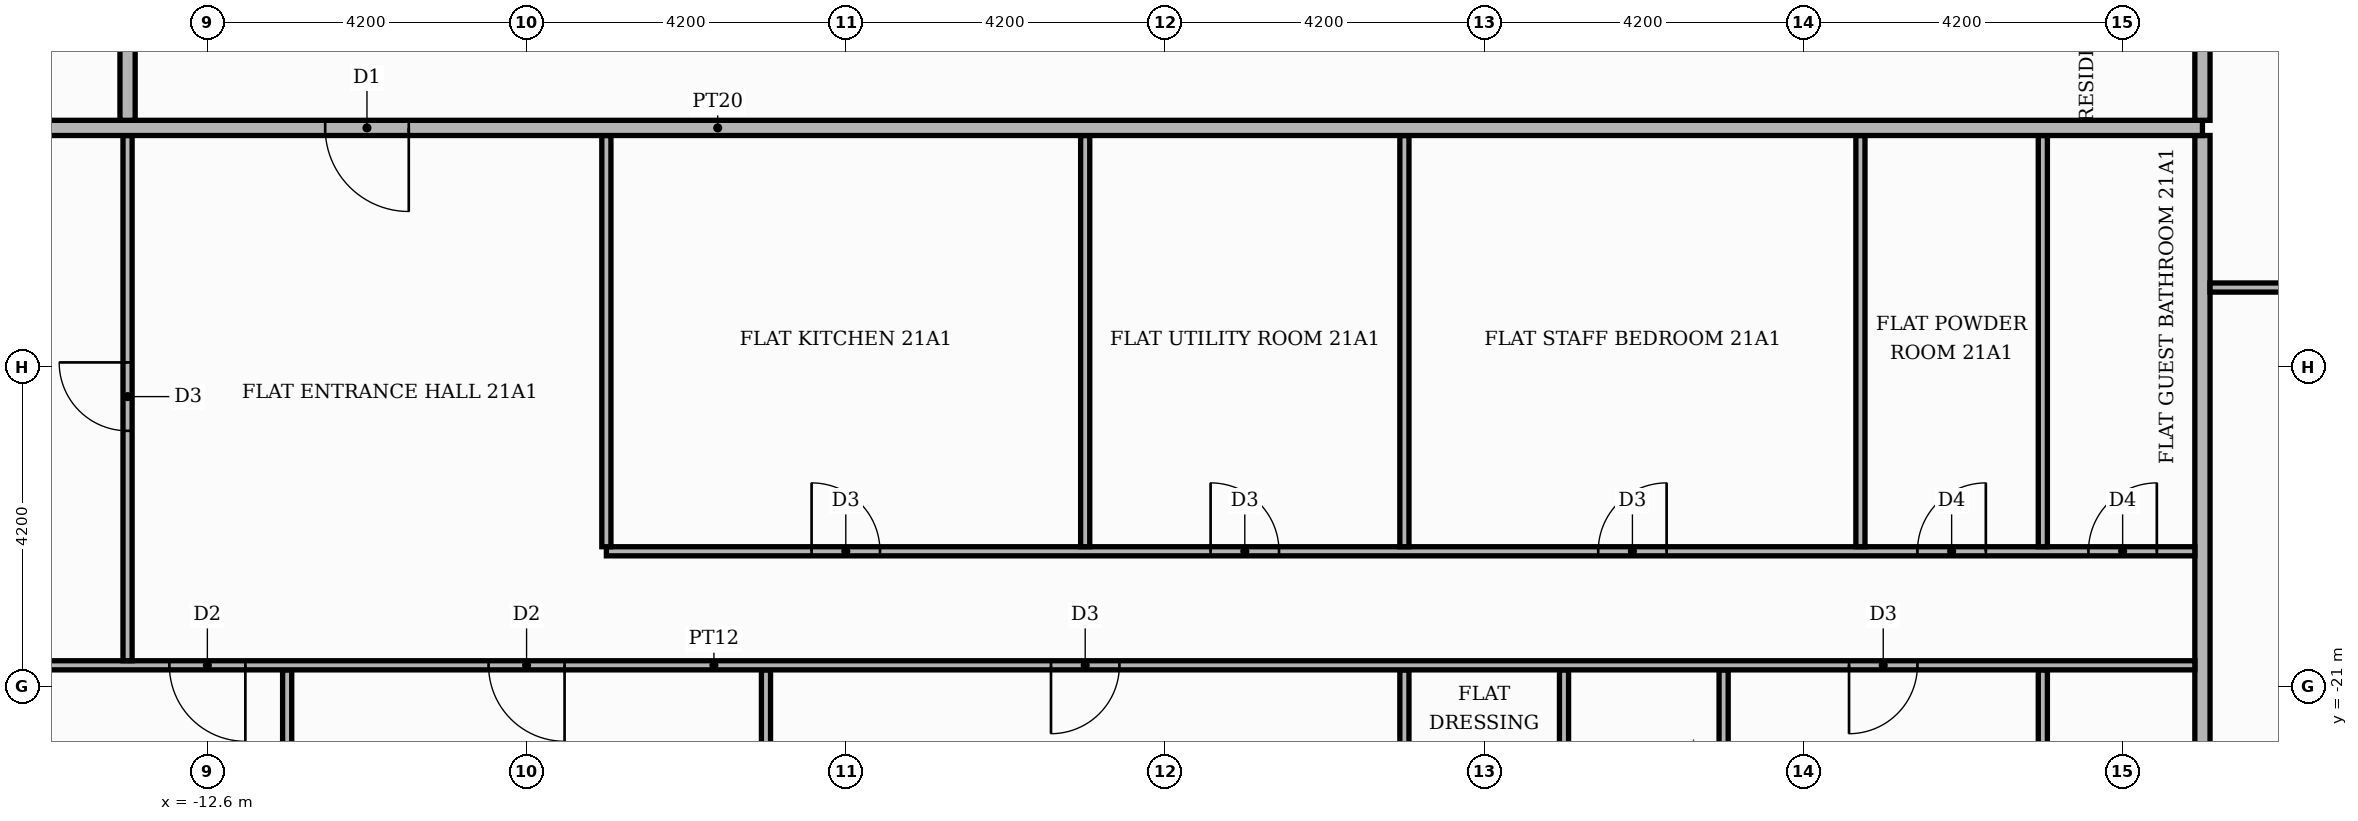
"""IFC4 building model, lengths in metres.
Left out: names, types, materials, properties, quantities, classifications, styles, units other than length and angle.
Written with IfcOpenShell. Run it as: python <this file> out.ifc"""

import sys

from ifc_helpers import new_model, si_unit, direction, frame, frame_2d, origin, place, context, subcontext, project, spatial, rectangle, extrude, element, fill, save


model = new_model("IFC4")
c1 = context("Model", 3, precision=1e-05, world=origin(), true_north=direction((0.0, 1.0)))
c2 = subcontext(c1, "Body", "Model", "MODEL_VIEW")
j1 = project(units=[si_unit("LENGTHUNIT", "METRE"), si_unit("PLANEANGLEUNIT", "RADIAN")], contexts=[c1])
p1 = place(None, origin())
s1 = spatial("IfcSite", under=j1, at=p1, CompositionType="ELEMENT")
p2 = place(p1, origin())
s2 = spatial("IfcBuilding", under=s1, at=p2, CompositionType="ELEMENT")
p3 = place(p2, frame((0.0, 0.0, 90.9)))
s3 = spatial("IfcBuildingStorey", under=s2, at=p3, CompositionType="ELEMENT", Elevation=90.9)
for number, where, z_axis, x_axis in (
    (1, (-11.55, -25.42, 0.0), (0.0, 0.0, 1.0), (0.0, 1.0, 0.0)),
    (2, (-5.25, -25.42, 0.0), (0.0, 0.0, 1.0), (0.0, 1.0, 0.0)),
):
    element("IfcWall", number, at=place(p3, frame(where, z_axis=z_axis, x_axis=x_axis)), inside=s3, PredefinedType="PARTITIONING", context=c2, shape_type="SweptSolid", body=[
        extrude(rectangle(XDim=4.64, YDim=0.12, at=frame_2d((2.32, 0.0))), origin(), (0.0, 0.0, 1.0), 3.48),
    ])
p4 = place(p3, frame((3.15, -25.42, 0.0), z_axis=(0.0, 0.0, 1.0), x_axis=(0.0, 1.0, 0.0)))
e3 = element("IfcWall", 3, at=p4, inside=s3, PredefinedType="PARTITIONING", context=c2, shape_type="SweptSolid", body=[
    extrude(rectangle(XDim=4.64, YDim=0.12, at=frame_2d((2.32, 0.0))), origin(), (0.0, 0.0, 1.0), 3.48),
])
p5 = place(p4, frame((1.75, 0.0, 0.0)))
e4 = element("IfcOpeningElement", 4, at=p5, cuts=e3, PredefinedType="OPENING", context=c2, shape_type="SweptSolid", body=[
    extrude(rectangle(XDim=0.9, YDim=2.1, at=frame_2d((0.45, 1.05))), frame((0.0, 0.07, 0.0), z_axis=(0.0, -1.0, 0.0), x_axis=(1.0, 0.0, 0.0)), (0.0, 0.0, 1.0), 0.14),
])
p6 = place(p3, frame((5.25, -25.42, 0.0), z_axis=(0.0, 0.0, 1.0), x_axis=(0.0, 1.0, 0.0)))
e5 = element("IfcWall", 5, at=p6, inside=s3, PredefinedType="PARTITIONING", context=c2, shape_type="SweptSolid", body=[
    extrude(rectangle(XDim=4.64, YDim=0.12, at=frame_2d((2.32, 0.0))), origin(), (0.0, 0.0, 1.0), 3.48),
])
p7 = place(p6, frame((1.75, 0.0, 0.0)))
e6 = element("IfcOpeningElement", 6, at=p7, cuts=e5, PredefinedType="OPENING", context=c2, shape_type="SweptSolid", body=[
    extrude(rectangle(XDim=0.9, YDim=2.1, at=frame_2d((0.45, 1.05))), frame((0.0, 0.07, 0.0), z_axis=(0.0, -1.0, 0.0), x_axis=(1.0, 0.0, 0.0)), (0.0, 0.0, 1.0), 0.14),
])
p8 = place(p3, frame((7.35, -25.42, 0.0), z_axis=(0.0, 0.0, 1.0), x_axis=(0.0, 1.0, 0.0)))
e7 = element("IfcWall", 7, at=p8, inside=s3, PredefinedType="PARTITIONING", context=c2, shape_type="SweptSolid", body=[
    extrude(rectangle(XDim=4.64, YDim=0.12, at=frame_2d((2.32, 0.0))), origin(), (0.0, 0.0, 1.0), 3.48),
])
p9 = place(p3, frame((11.55, -25.42, 0.0), z_axis=(0.0, 0.0, 1.0), x_axis=(0.0, 1.0, 0.0)))
e8 = element("IfcWall", 8, at=p9, inside=s3, PredefinedType="PARTITIONING", context=c2, shape_type="SweptSolid", body=[
    extrude(rectangle(XDim=4.64, YDim=0.12, at=frame_2d((2.32, 0.0))), origin(), (0.0, 0.0, 1.0), 3.48),
])
p10 = place(p9, frame((1.75, 0.0, 0.0)))
e9 = element("IfcOpeningElement", 9, at=p10, cuts=e8, PredefinedType="OPENING", context=c2, shape_type="SweptSolid", body=[
    extrude(rectangle(XDim=0.9, YDim=2.1, at=frame_2d((0.45, 1.05))), frame((0.0, 0.07, 0.0), z_axis=(0.0, -1.0, 0.0), x_axis=(1.0, 0.0, 0.0)), (0.0, 0.0, 1.0), 0.14),
])
p11 = place(p3, frame((13.65, -25.42, 0.0), z_axis=(0.0, 0.0, 1.0), x_axis=(0.0, 1.0, 0.0)))
e10 = element("IfcWall", 10, at=p11, inside=s3, PredefinedType="PARTITIONING", context=c2, shape_type="SweptSolid", body=[
    extrude(rectangle(XDim=11.67, YDim=0.2, at=frame_2d((5.835, 0.0))), origin(), (0.0, 0.0, 1.0), 3.48),
])
p12 = place(p3, frame((-25.42, -20.72, 0.0), z_axis=(0.0, 0.0, 1.0), x_axis=(1.0, 0.0, 0.0)))
e11 = element("IfcWall", 11, at=p12, inside=s3, PredefinedType="PARTITIONING", context=c2, shape_type="SweptSolid", body=[
    extrude(rectangle(XDim=38.97, YDim=0.12, at=frame_2d((19.485, 0.0))), origin(), (0.0, 0.0, 1.0), 3.48),
])
p13 = place(p12, frame((12.32, 0.0, 0.0)))
e12 = element("IfcOpeningElement", 12, at=p13, cuts=e11, PredefinedType="OPENING", context=c2, shape_type="SweptSolid", body=[
    extrude(rectangle(XDim=1.0, YDim=2.1, at=frame_2d((0.5, 1.05))), frame((0.0, 0.07, 0.0), z_axis=(0.0, -1.0, 0.0), x_axis=(1.0, 0.0, 0.0)), (0.0, 0.0, 1.0), 0.14),
])
p14 = place(p12, frame((16.52, 0.0, 0.0)))
e13 = element("IfcOpeningElement", 13, at=p14, cuts=e11, PredefinedType="OPENING", context=c2, shape_type="SweptSolid", body=[
    extrude(rectangle(XDim=1.0, YDim=2.1, at=frame_2d((0.5, 1.05))), frame((0.0, 0.07, 0.0), z_axis=(0.0, -1.0, 0.0), x_axis=(1.0, 0.0, 0.0)), (0.0, 0.0, 1.0), 0.14),
])
p15 = place(p12, frame((23.92, 0.0, 0.0)))
e14 = element("IfcOpeningElement", 14, at=p15, cuts=e11, PredefinedType="OPENING", context=c2, shape_type="SweptSolid", body=[
    extrude(rectangle(XDim=0.9, YDim=2.1, at=frame_2d((0.45, 1.05))), frame((0.0, 0.07, 0.0), z_axis=(0.0, -1.0, 0.0), x_axis=(1.0, 0.0, 0.0)), (0.0, 0.0, 1.0), 0.14),
])
p16 = place(p12, frame((34.42, 0.0, 0.0)))
e15 = element("IfcOpeningElement", 15, at=p16, cuts=e11, PredefinedType="OPENING", context=c2, shape_type="SweptSolid", body=[
    extrude(rectangle(XDim=0.9, YDim=2.1, at=frame_2d((0.45, 1.05))), frame((0.0, 0.07, 0.0), z_axis=(0.0, -1.0, 0.0), x_axis=(1.0, 0.0, 0.0)), (0.0, 0.0, 1.0), 0.14),
])
p17 = place(p3, frame((-13.65, -20.66, 0.0), z_axis=(0.0, 0.0, 1.0), x_axis=(0.0, 1.0, 0.0)))
e16 = element("IfcWall", 16, at=p17, inside=s3, PredefinedType="PARTITIONING", context=c2, shape_type="SweptSolid", body=[
    extrude(rectangle(XDim=6.91, YDim=0.12, at=frame_2d((3.455, 0.0))), origin(), (0.0, 0.0, 1.0), 3.48),
])
p18 = place(p17, frame((3.025, 0.0, 0.0)))
e17 = element("IfcOpeningElement", 17, at=p18, cuts=e16, PredefinedType="OPENING", context=c2, shape_type="SweptSolid", body=[
    extrude(rectangle(XDim=0.9, YDim=2.1, at=frame_2d((0.45, 1.05))), frame((0.0, 0.07, 0.0), z_axis=(0.0, -1.0, 0.0), x_axis=(1.0, 0.0, 0.0)), (0.0, 0.0, 1.0), 0.14),
])
p19 = place(p3, frame((-7.35, -19.22, 0.0), z_axis=(0.0, 0.0, 1.0), x_axis=(1.0, 0.0, 0.0)))
e18 = element("IfcWall", 18, at=p19, inside=s3, PredefinedType="PARTITIONING", context=c2, shape_type="SweptSolid", body=[
    extrude(rectangle(XDim=20.9, YDim=0.12, at=frame_2d((10.45, 0.0))), origin(), (0.0, 0.0, 1.0), 3.48),
])
p20 = place(p19, frame((2.7, 0.0, 0.0)))
e19 = element("IfcOpeningElement", 19, at=p20, cuts=e18, PredefinedType="OPENING", context=c2, shape_type="SweptSolid", body=[
    extrude(rectangle(XDim=0.9, YDim=2.1, at=frame_2d((0.45, 1.05))), frame((0.0, 0.07, 0.0), z_axis=(0.0, -1.0, 0.0), x_axis=(1.0, 0.0, 0.0)), (0.0, 0.0, 1.0), 0.14),
])
p21 = place(p19, frame((7.95, 0.0, 0.0)))
e20 = element("IfcOpeningElement", 20, at=p21, cuts=e18, PredefinedType="OPENING", context=c2, shape_type="SweptSolid", body=[
    extrude(rectangle(XDim=0.9, YDim=2.1, at=frame_2d((0.45, 1.05))), frame((0.0, 0.07, 0.0), z_axis=(0.0, -1.0, 0.0), x_axis=(1.0, 0.0, 0.0)), (0.0, 0.0, 1.0), 0.14),
])
p22 = place(p19, frame((13.05, 0.0, 0.0)))
e21 = element("IfcOpeningElement", 21, at=p22, cuts=e18, PredefinedType="OPENING", context=c2, shape_type="SweptSolid", body=[
    extrude(rectangle(XDim=0.9, YDim=2.1, at=frame_2d((0.45, 1.05))), frame((0.0, 0.07, 0.0), z_axis=(0.0, -1.0, 0.0), x_axis=(1.0, 0.0, 0.0)), (0.0, 0.0, 1.0), 0.14),
])
p23 = place(p19, frame((17.25, 0.0, 0.0)))
e22 = element("IfcOpeningElement", 22, at=p23, cuts=e18, PredefinedType="OPENING", context=c2, shape_type="SweptSolid", body=[
    extrude(rectangle(XDim=0.9, YDim=2.1, at=frame_2d((0.45, 1.05))), frame((0.0, 0.07, 0.0), z_axis=(0.0, -1.0, 0.0), x_axis=(1.0, 0.0, 0.0)), (0.0, 0.0, 1.0), 0.14),
])
p24 = place(p19, frame((19.5, 0.0, 0.0)))
e23 = element("IfcOpeningElement", 23, at=p24, cuts=e18, PredefinedType="OPENING", context=c2, shape_type="SweptSolid", body=[
    extrude(rectangle(XDim=0.9, YDim=2.1, at=frame_2d((0.45, 1.05))), frame((0.0, 0.07, 0.0), z_axis=(0.0, -1.0, 0.0), x_axis=(1.0, 0.0, 0.0)), (0.0, 0.0, 1.0), 0.14),
])
for number, where, z_axis, x_axis in (
    (24, (-7.35, -19.16, 0.0), (0.0, 0.0, 1.0), (0.0, 1.0, 0.0)),
    (25, (-1.05, -19.16, 0.0), (0.0, 0.0, 1.0), (0.0, 1.0, 0.0)),
    (26, (3.15, -19.16, 0.0), (0.0, 0.0, 1.0), (0.0, 1.0, 0.0)),
    (27, (9.15, -19.16, 0.0), (0.0, 0.0, 1.0), (0.0, 1.0, 0.0)),
    (28, (11.55, -19.16, 0.0), (0.0, 0.0, 1.0), (0.0, 1.0, 0.0)),
):
    element("IfcWall", number, at=place(p3, frame(where, z_axis=z_axis, x_axis=x_axis)), inside=s3, PredefinedType="PARTITIONING", context=c2, shape_type="SweptSolid", body=[
        extrude(rectangle(XDim=5.41, YDim=0.12, at=frame_2d((2.705, 0.0))), origin(), (0.0, 0.0, 1.0), 3.48),
    ])
p25 = place(p3, frame((13.75, -15.75, 0.0), z_axis=(0.0, 0.0, 1.0), x_axis=(1.0, 0.0, 0.0)))
e29 = element("IfcWall", 29, at=p25, inside=s3, PredefinedType="PARTITIONING", context=c2, shape_type="SweptSolid", body=[
    extrude(rectangle(XDim=6.67, YDim=0.12, at=frame_2d((3.335, 0.0))), origin(), (0.0, 0.0, 1.0), 3.48),
])
p26 = place(p25, frame((2.785, 0.0, 0.0)))
e30 = element("IfcOpeningElement", 30, at=p26, cuts=e29, PredefinedType="OPENING", context=c2, shape_type="SweptSolid", body=[
    extrude(rectangle(XDim=1.0, YDim=2.1, at=frame_2d((0.5, 1.05))), frame((0.0, 0.07, 0.0), z_axis=(0.0, -1.0, 0.0), x_axis=(1.0, 0.0, 0.0)), (0.0, 0.0, 1.0), 0.14),
])
p27 = place(p3, frame((-25.42, -13.65, 0.0), z_axis=(0.0, 0.0, 1.0), x_axis=(1.0, 0.0, 0.0)))
e31 = element("IfcWall", 31, at=p27, inside=s3, PredefinedType="PARTITIONING", context=c2, shape_type="SweptSolid", body=[
    extrude(rectangle(XDim=39.07, YDim=0.2, at=frame_2d((19.535, 0.0))), origin(), (0.0, 0.0, 1.0), 3.48),
])
p28 = place(p27, frame((14.37, 0.0, 0.0)))
e32 = element("IfcOpeningElement", 32, at=p28, cuts=e31, PredefinedType="OPENING", context=c2, shape_type="SweptSolid", body=[
    extrude(rectangle(XDim=1.1, YDim=2.4, at=frame_2d((0.55, 1.2))), frame((0.0, 0.11, 0.0), z_axis=(0.0, -1.0, 0.0), x_axis=(1.0, 0.0, 0.0)), (0.0, 0.0, 1.0), 0.22),
])
p29 = place(p3, frame((-13.65, -13.55, 0.0), z_axis=(0.0, 0.0, 1.0), x_axis=(0.0, 1.0, 0.0)))
e33 = element("IfcWall", 33, at=p29, inside=s3, PredefinedType="PARTITIONING", context=c2, shape_type="SweptSolid", body=[
    extrude(rectangle(XDim=27.1, YDim=0.2, at=frame_2d((13.55, 0.0))), origin(), (0.0, 0.0, 1.0), 3.48),
])
p30 = place(p29, frame((24.55, 0.0, 0.0)))
e34 = element("IfcOpeningElement", 34, at=p30, cuts=e33, PredefinedType="OPENING", context=c2, shape_type="SweptSolid", body=[
    extrude(rectangle(XDim=1.1, YDim=2.4, at=frame_2d((0.55, 1.2))), frame((0.0, 0.11, 0.0), z_axis=(0.0, -1.0, 0.0), x_axis=(1.0, 0.0, 0.0)), (0.0, 0.0, 1.0), 0.22),
])
p31 = place(p3, frame((13.65, -13.55, 0.0), z_axis=(0.0, 0.0, 1.0), x_axis=(0.0, 1.0, 0.0)))
e35 = element("IfcWall", 35, at=p31, inside=s3, PredefinedType="PARTITIONING", context=c2, shape_type="SweptSolid", body=[
    extrude(rectangle(XDim=8.2, YDim=0.2, at=frame_2d((4.1, 0.0))), origin(), (0.0, 0.0, 1.0), 3.48),
])
p32 = place(p31, frame((1.45, 0.0, 0.0)))
e36 = element("IfcOpeningElement", 36, at=p32, cuts=e35, PredefinedType="OPENING", context=c2, shape_type="SweptSolid", body=[
    extrude(rectangle(XDim=1.1, YDim=2.4, at=frame_2d((0.55, 1.2))), frame((0.0, 0.11, 0.0), z_axis=(0.0, -1.0, 0.0), x_axis=(1.0, 0.0, 0.0)), (0.0, 0.0, 1.0), 0.22),
])
p33 = place(p28, frame((1.1, 0.0, 0.0), z_axis=(0.0, 0.0, 1.0), x_axis=(-1.0, 0.0, 0.0)))
e37 = element("IfcDoor", 37, at=p33, inside=s3, OperationType="SINGLE_SWING_RIGHT", PredefinedType="DOOR", context=c2, shape_type="SweptSolid", body=[
    extrude(rectangle(XDim=1.1, YDim=2.4, at=frame_2d((0.55, 1.2))), frame((0.0, 0.025, 0.0), z_axis=(0.0, -1.0, 0.0), x_axis=(1.0, 0.0, 0.0)), (0.0, 0.0, 1.0), 0.05),
])
fill(e32, e37)
p34 = place(p18, origin())
e38 = element("IfcDoor", 38, at=p34, inside=s3, OperationType="SINGLE_SWING_RIGHT", PredefinedType="DOOR", context=c2, shape_type="SweptSolid", body=[
    extrude(rectangle(XDim=0.9, YDim=2.1, at=frame_2d((0.45, 1.05))), frame((0.0, 0.025, 0.0), z_axis=(0.0, -1.0, 0.0), x_axis=(1.0, 0.0, 0.0)), (0.0, 0.0, 1.0), 0.05),
])
fill(e17, e38)
p35 = place(p20, origin())
e39 = element("IfcDoor", 39, at=p35, inside=s3, OperationType="SINGLE_SWING_LEFT", PredefinedType="DOOR", context=c2, shape_type="SweptSolid", body=[
    extrude(rectangle(XDim=0.9, YDim=2.1, at=frame_2d((0.45, 1.05))), frame((0.0, 0.025, 0.0), z_axis=(0.0, -1.0, 0.0), x_axis=(1.0, 0.0, 0.0)), (0.0, 0.0, 1.0), 0.05),
])
fill(e19, e39)
p36 = place(p21, origin())
e40 = element("IfcDoor", 40, at=p36, inside=s3, OperationType="SINGLE_SWING_LEFT", PredefinedType="DOOR", context=c2, shape_type="SweptSolid", body=[
    extrude(rectangle(XDim=0.9, YDim=2.1, at=frame_2d((0.45, 1.05))), frame((0.0, 0.025, 0.0), z_axis=(0.0, -1.0, 0.0), x_axis=(1.0, 0.0, 0.0)), (0.0, 0.0, 1.0), 0.05),
])
fill(e20, e40)
p37 = place(p22, origin())
e41 = element("IfcDoor", 41, at=p37, inside=s3, OperationType="SINGLE_SWING_RIGHT", PredefinedType="DOOR", context=c2, shape_type="SweptSolid", body=[
    extrude(rectangle(XDim=0.9, YDim=2.1, at=frame_2d((0.45, 1.05))), frame((0.0, 0.025, 0.0), z_axis=(0.0, -1.0, 0.0), x_axis=(1.0, 0.0, 0.0)), (0.0, 0.0, 1.0), 0.05),
])
fill(e21, e41)
p38 = place(p23, origin())
e42 = element("IfcDoor", 42, at=p38, inside=s3, OperationType="SINGLE_SWING_RIGHT", PredefinedType="DOOR", context=c2, shape_type="SweptSolid", body=[
    extrude(rectangle(XDim=0.9, YDim=2.1, at=frame_2d((0.45, 1.05))), frame((0.0, 0.025, 0.0), z_axis=(0.0, -1.0, 0.0), x_axis=(1.0, 0.0, 0.0)), (0.0, 0.0, 1.0), 0.05),
])
fill(e22, e42)
p39 = place(p24, origin())
e43 = element("IfcDoor", 43, at=p39, inside=s3, OperationType="SINGLE_SWING_RIGHT", PredefinedType="DOOR", context=c2, shape_type="SweptSolid", body=[
    extrude(rectangle(XDim=0.9, YDim=2.1, at=frame_2d((0.45, 1.05))), frame((0.0, 0.025, 0.0), z_axis=(0.0, -1.0, 0.0), x_axis=(1.0, 0.0, 0.0)), (0.0, 0.0, 1.0), 0.05),
])
fill(e23, e43)
p40 = place(p13, frame((1.0, 0.0, 0.0), z_axis=(0.0, 0.0, 1.0), x_axis=(-1.0, 0.0, 0.0)))
e44 = element("IfcDoor", 44, at=p40, inside=s3, OperationType="SINGLE_SWING_RIGHT", PredefinedType="DOOR", context=c2, shape_type="SweptSolid", body=[
    extrude(rectangle(XDim=1.0, YDim=2.1, at=frame_2d((0.5, 1.05))), frame((0.0, 0.025, 0.0), z_axis=(0.0, -1.0, 0.0), x_axis=(1.0, 0.0, 0.0)), (0.0, 0.0, 1.0), 0.05),
])
fill(e12, e44)
p41 = place(p14, frame((1.0, 0.0, 0.0), z_axis=(0.0, 0.0, 1.0), x_axis=(-1.0, 0.0, 0.0)))
e45 = element("IfcDoor", 45, at=p41, inside=s3, OperationType="SINGLE_SWING_RIGHT", PredefinedType="DOOR", context=c2, shape_type="SweptSolid", body=[
    extrude(rectangle(XDim=1.0, YDim=2.1, at=frame_2d((0.5, 1.05))), frame((0.0, 0.025, 0.0), z_axis=(0.0, -1.0, 0.0), x_axis=(1.0, 0.0, 0.0)), (0.0, 0.0, 1.0), 0.05),
])
fill(e13, e45)
p42 = place(p15, frame((0.9, 0.0, 0.0), z_axis=(0.0, 0.0, 1.0), x_axis=(-1.0, 0.0, 0.0)))
e46 = element("IfcDoor", 46, at=p42, inside=s3, OperationType="SINGLE_SWING_LEFT", PredefinedType="DOOR", context=c2, shape_type="SweptSolid", body=[
    extrude(rectangle(XDim=0.9, YDim=2.1, at=frame_2d((0.45, 1.05))), frame((0.0, 0.025, 0.0), z_axis=(0.0, -1.0, 0.0), x_axis=(1.0, 0.0, 0.0)), (0.0, 0.0, 1.0), 0.05),
])
fill(e14, e46)
p43 = place(p16, frame((0.9, 0.0, 0.0), z_axis=(0.0, 0.0, 1.0), x_axis=(-1.0, 0.0, 0.0)))
e47 = element("IfcDoor", 47, at=p43, inside=s3, OperationType="SINGLE_SWING_LEFT", PredefinedType="DOOR", context=c2, shape_type="SweptSolid", body=[
    extrude(rectangle(XDim=0.9, YDim=2.1, at=frame_2d((0.45, 1.05))), frame((0.0, 0.025, 0.0), z_axis=(0.0, -1.0, 0.0), x_axis=(1.0, 0.0, 0.0)), (0.0, 0.0, 1.0), 0.05),
])
fill(e15, e47)
save(model, sys.argv[1])
